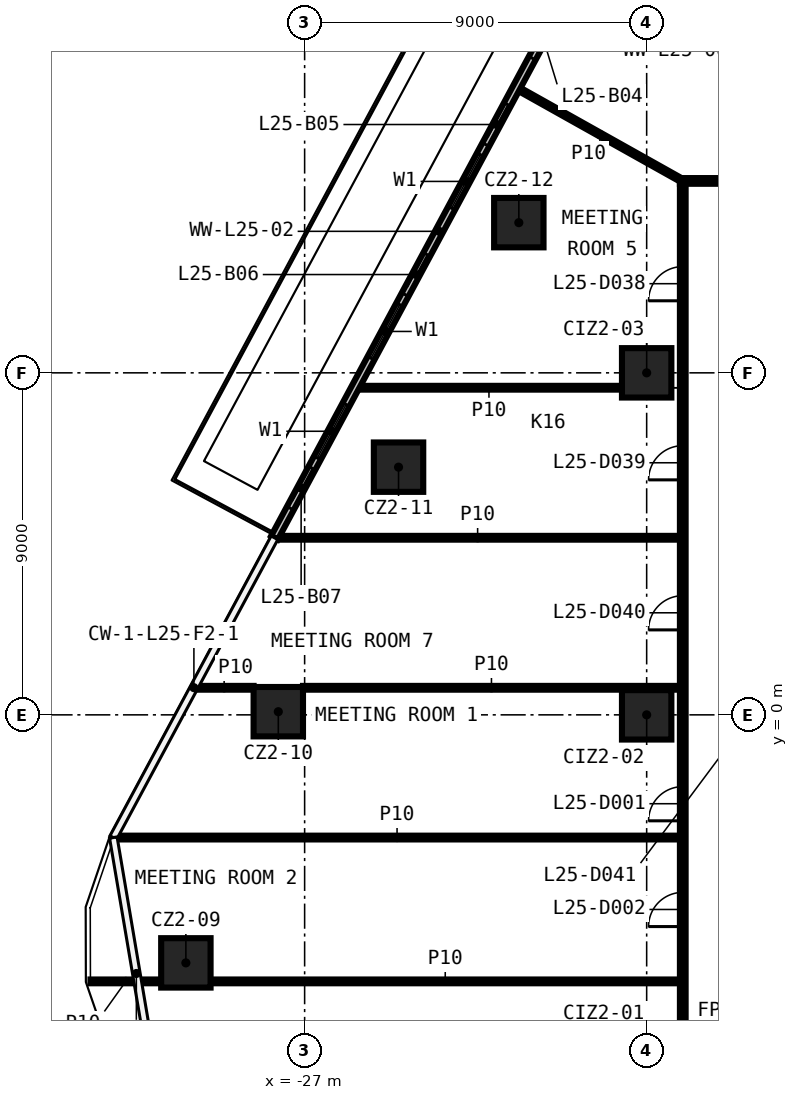
"""IFC4 building model, lengths in metres.
Left out: names, types, materials, properties, quantities, classifications, styles, units other than length and angle.
Written with IfcOpenShell. Run it as: python <this file> out.ifc"""

import sys

from ifc_helpers import new_model, si_unit, direction, frame, frame_2d, origin, origin_2d, place, context, subcontext, project, spatial, rectangle, extrude, element, fill, save


model = new_model("IFC4")
c1 = context("Model", 3, precision=1e-05, world=origin(), true_north=direction((0.0, 1.0)))
c2 = subcontext(c1, "Body", "Model", "MODEL_VIEW")
j1 = project(units=[si_unit("LENGTHUNIT", "METRE"), si_unit("PLANEANGLEUNIT", "RADIAN")], contexts=[c1])
p1 = place(None, origin())
s1 = spatial("IfcSite", under=j1, at=p1, CompositionType="ELEMENT")
p2 = place(p1, origin())
s2 = spatial("IfcBuilding", under=s1, at=p2, CompositionType="ELEMENT")
p3 = place(p2, frame((0.0, 0.0, 117.4)))
s3 = spatial("IfcBuildingStorey", under=s2, at=p3, CompositionType="ELEMENT", Elevation=117.4)
for number, where, z_axis, x_axis in (
    (1, (-30.125, -6.527, 0.0), (0.0, 0.0, 1.0), (1.0, 0.0, 0.0)),
    (2, (-27.693, 0.083, 0.0), (0.0, 0.0, 1.0), (1.0, 0.0, 0.0)),
    (3, (-24.529, 6.518, 0.0), (0.0, 0.0, 1.0), (1.0, 0.0, 0.0)),
    (4, (-21.364, 12.952, 0.0), (0.0, 0.0, 1.0), (1.0, 0.0, 0.0)),
    (5, (-18.0, 0.0, 0.0), (0.0, 0.0, 1.0), (1.0, 0.0, 0.0)),
    (6, (-18.0, 9.0, 0.0), (0.0, 0.0, 1.0), (1.0, 0.0, 0.0)),
):
    element("IfcColumn", number, at=place(p3, frame(where, z_axis=z_axis, x_axis=x_axis)), inside=s3, PredefinedType="COLUMN", context=c2, shape_type="SweptSolid", body=[
        extrude(rectangle(XDim=1.3, YDim=1.3, at=origin_2d()), origin(), (0.0, 0.0, 1.0), 3.3),
    ])
p4 = place(p3, frame((-32.635, -7.014, 0.0), z_axis=(0.0, 0.0, 1.0), x_axis=(1.0, 0.0, 0.0)))
e7 = element("IfcWall", 7, at=p4, inside=s3, PredefinedType="PARTITIONING", context=c2, shape_type="SweptSolid", body=[
    extrude(rectangle(XDim=1.86, YDim=0.1, at=frame_2d((0.93, 0.0))), origin(), (0.0, 0.0, 1.0), 3.3),
])
p5 = place(p3, frame((-29.475, -7.014, 0.0), z_axis=(0.0, 0.0, 1.0), x_axis=(1.0, 0.0, 0.0)))
e8 = element("IfcWall", 8, at=p5, inside=s3, PredefinedType="PARTITIONING", context=c2, shape_type="SweptSolid", body=[
    extrude(rectangle(XDim=12.35, YDim=0.1, at=frame_2d((6.175, 0.0))), origin(), (0.0, 0.0, 1.0), 3.3),
])
p6 = place(p3, frame((-32.011, -3.229, 0.0), z_axis=(0.0, 0.0, 1.0), x_axis=(1.0, 0.0, 0.0)))
e9 = element("IfcWall", 9, at=p6, inside=s3, PredefinedType="PARTITIONING", context=c2, shape_type="SweptSolid", body=[
    extrude(rectangle(XDim=14.886, YDim=0.1, at=frame_2d((7.443, 0.0))), origin(), (0.0, 0.0, 1.0), 3.3),
])
p7 = place(p3, frame((-29.893, 0.712, 0.0), z_axis=(0.0, 0.0, 1.0), x_axis=(1.0, 0.0, 0.0)))
e10 = element("IfcWall", 10, at=p7, inside=s3, PredefinedType="PARTITIONING", context=c2, shape_type="SweptSolid", body=[
    extrude(rectangle(XDim=1.55, YDim=0.1, at=frame_2d((0.775, 0.0))), origin(), (0.0, 0.0, 1.0), 3.3),
])
p8 = place(p3, frame((-27.043, 0.712, 0.0), z_axis=(0.0, 0.0, 1.0), x_axis=(1.0, 0.0, 0.0)))
e11 = element("IfcWall", 11, at=p8, inside=s3, PredefinedType="PARTITIONING", context=c2, shape_type="SweptSolid", body=[
    extrude(rectangle(XDim=9.918, YDim=0.1, at=frame_2d((4.959, 0.0))), origin(), (0.0, 0.0, 1.0), 3.3),
])
p9 = place(p3, frame((-27.771, 4.66, 0.0), z_axis=(0.0, 0.0, 1.0), x_axis=(1.0, 0.0, 0.0)))
e12 = element("IfcWall", 12, at=p9, inside=s3, PredefinedType="PARTITIONING", context=c2, shape_type="SweptSolid", body=[
    extrude(rectangle(XDim=10.646, YDim=0.1, at=frame_2d((5.323, 0.0))), origin(), (0.0, 0.0, 1.0), 3.3),
])
p10 = place(p3, frame((-25.649, 8.608, 0.0), z_axis=(0.0, 0.0, 1.0), x_axis=(1.0, 0.0, 0.0)))
e13 = element("IfcWall", 13, at=p10, inside=s3, PredefinedType="PARTITIONING", context=c2, shape_type="SweptSolid", body=[
    extrude(rectangle(XDim=6.999, YDim=0.1, at=frame_2d((3.5, 0.0))), origin(), (0.0, 0.0, 1.0), 3.3),
])
p11 = place(p3, frame((-17.125, 14.05, 0.0), z_axis=(0.0, 0.0, 1.0), x_axis=(1.0, 0.0, 0.0)))
e14 = element("IfcWall", 14, at=p11, inside=s3, PredefinedType="PARTITIONING", context=c2, shape_type="SweptSolid", body=[
    extrude(rectangle(XDim=34.25, YDim=0.15, at=frame_2d((17.125, 0.0))), origin(), (0.0, 0.0, 1.0), 3.3),
])
p12 = place(p11, frame((30.377, 0.0, 0.0)))
e15 = element("IfcOpeningElement", 15, at=p12, cuts=e14, PredefinedType="OPENING", context=c2, shape_type="SweptSolid", body=[
    extrude(rectangle(XDim=0.9, YDim=2.1, at=frame_2d((0.45, 1.05))), frame((0.0, 0.085, 0.0), z_axis=(0.0, -1.0, 0.0), x_axis=(1.0, 0.0, 0.0)), (0.0, 0.0, 1.0), 0.17),
])
p13 = place(p11, frame((23.321, 0.0, 0.0)))
e16 = element("IfcOpeningElement", 16, at=p13, cuts=e14, PredefinedType="OPENING", context=c2, shape_type="SweptSolid", body=[
    extrude(rectangle(XDim=1.0, YDim=2.1, at=frame_2d((0.5, 1.05))), frame((0.0, 0.085, 0.0), z_axis=(0.0, -1.0, 0.0), x_axis=(1.0, 0.0, 0.0)), (0.0, 0.0, 1.0), 0.17),
])
p14 = place(p11, frame((21.183, 0.0, 0.0)))
e17 = element("IfcOpeningElement", 17, at=p14, cuts=e14, PredefinedType="OPENING", context=c2, shape_type="SweptSolid", body=[
    extrude(rectangle(XDim=1.0, YDim=2.1, at=frame_2d((0.5, 1.05))), frame((0.0, 0.085, 0.0), z_axis=(0.0, -1.0, 0.0), x_axis=(1.0, 0.0, 0.0)), (0.0, 0.0, 1.0), 0.17),
])
p15 = place(p11, frame((14.241, 0.0, 0.0)))
e18 = element("IfcOpeningElement", 18, at=p15, cuts=e14, PredefinedType="OPENING", context=c2, shape_type="SweptSolid", body=[
    extrude(rectangle(XDim=1.0, YDim=2.1, at=frame_2d((0.5, 1.05))), frame((0.0, 0.085, 0.0), z_axis=(0.0, -1.0, 0.0), x_axis=(1.0, 0.0, 0.0)), (0.0, 0.0, 1.0), 0.17),
])
p16 = place(p11, frame((12.099, 0.0, 0.0)))
e19 = element("IfcOpeningElement", 19, at=p16, cuts=e14, PredefinedType="OPENING", context=c2, shape_type="SweptSolid", body=[
    extrude(rectangle(XDim=1.0, YDim=2.1, at=frame_2d((0.5, 1.05))), frame((0.0, 0.085, 0.0), z_axis=(0.0, -1.0, 0.0), x_axis=(1.0, 0.0, 0.0)), (0.0, 0.0, 1.0), 0.17),
])
p17 = place(p11, frame((5.161, 0.0, 0.0)))
e20 = element("IfcOpeningElement", 20, at=p17, cuts=e14, PredefinedType="OPENING", context=c2, shape_type="SweptSolid", body=[
    extrude(rectangle(XDim=1.0, YDim=2.1, at=frame_2d((0.5, 1.05))), frame((0.0, 0.085, 0.0), z_axis=(0.0, -1.0, 0.0), x_axis=(1.0, 0.0, 0.0)), (0.0, 0.0, 1.0), 0.17),
])
p18 = place(p11, frame((2.406, 0.0, 0.0)))
e21 = element("IfcOpeningElement", 21, at=p18, cuts=e14, PredefinedType="OPENING", context=c2, shape_type="SweptSolid", body=[
    extrude(rectangle(XDim=0.9, YDim=2.1, at=frame_2d((0.45, 1.05))), frame((0.0, 0.085, 0.0), z_axis=(0.0, -1.0, 0.0), x_axis=(1.0, 0.0, 0.0)), (0.0, 0.0, 1.0), 0.17),
])
p19 = place(p3, frame((-17.05, -13.975, 0.0), z_axis=(0.0, 0.0, 1.0), x_axis=(0.0, 1.0, 0.0)))
e22 = element("IfcWall", 22, at=p19, inside=s3, PredefinedType="PARTITIONING", context=c2, shape_type="SweptSolid", body=[
    extrude(rectangle(XDim=27.95, YDim=0.15, at=frame_2d((13.975, 0.0))), origin(), (0.0, 0.0, 1.0), 3.3),
])
p20 = place(p19, frame((11.186, 0.0, 0.0)))
e23 = element("IfcOpeningElement", 23, at=p20, cuts=e22, PredefinedType="OPENING", context=c2, shape_type="SweptSolid", body=[
    extrude(rectangle(XDim=0.9, YDim=2.1, at=frame_2d((0.45, 1.05))), frame((0.0, 0.085, 0.0), z_axis=(0.0, -1.0, 0.0), x_axis=(1.0, 0.0, 0.0)), (0.0, 0.0, 1.0), 0.17),
])
p21 = place(p19, frame((8.404, 0.0, 0.0)))
e24 = element("IfcOpeningElement", 24, at=p21, cuts=e22, PredefinedType="OPENING", context=c2, shape_type="SweptSolid", body=[
    extrude(rectangle(XDim=0.9, YDim=2.1, at=frame_2d((0.45, 1.05))), frame((0.0, 0.085, 0.0), z_axis=(0.0, -1.0, 0.0), x_axis=(1.0, 0.0, 0.0)), (0.0, 0.0, 1.0), 0.17),
])
p22 = place(p19, frame((1.58, 0.0, 0.0)))
e25 = element("IfcOpeningElement", 25, at=p22, cuts=e22, PredefinedType="OPENING", context=c2, shape_type="SweptSolid", body=[
    extrude(rectangle(XDim=0.9, YDim=2.1, at=frame_2d((0.45, 1.05))), frame((0.0, 0.085, 0.0), z_axis=(0.0, -1.0, 0.0), x_axis=(1.0, 0.0, 0.0)), (0.0, 0.0, 1.0), 0.17),
])
p23 = place(p19, frame((24.871, 0.0, 0.0)))
e26 = element("IfcOpeningElement", 26, at=p23, cuts=e22, PredefinedType="OPENING", context=c2, shape_type="SweptSolid", body=[
    extrude(rectangle(XDim=0.9, YDim=2.1, at=frame_2d((0.45, 1.05))), frame((0.0, 0.085, 0.0), z_axis=(0.0, -1.0, 0.0), x_axis=(1.0, 0.0, 0.0)), (0.0, 0.0, 1.0), 0.17),
])
p24 = place(p19, frame((20.159, 0.0, 0.0)))
e27 = element("IfcOpeningElement", 27, at=p24, cuts=e22, PredefinedType="OPENING", context=c2, shape_type="SweptSolid", body=[
    extrude(rectangle(XDim=0.9, YDim=2.1, at=frame_2d((0.45, 1.05))), frame((0.0, 0.085, 0.0), z_axis=(0.0, -1.0, 0.0), x_axis=(1.0, 0.0, 0.0)), (0.0, 0.0, 1.0), 0.17),
])
p25 = place(p19, frame((16.211, 0.0, 0.0)))
e28 = element("IfcOpeningElement", 28, at=p25, cuts=e22, PredefinedType="OPENING", context=c2, shape_type="SweptSolid", body=[
    extrude(rectangle(XDim=0.9, YDim=2.1, at=frame_2d((0.45, 1.05))), frame((0.0, 0.085, 0.0), z_axis=(0.0, -1.0, 0.0), x_axis=(1.0, 0.0, 0.0)), (0.0, 0.0, 1.0), 0.17),
])
p26 = place(p3, frame((-21.411, 16.494, 0.0), z_axis=(0.0, 0.0, 1.0), x_axis=(0.872342728858, -0.488894838803, 0.0)))
e29 = element("IfcWall", 29, at=p26, inside=s3, PredefinedType="PARTITIONING", context=c2, shape_type="SweptSolid", body=[
    extrude(rectangle(XDim=4.999, YDim=0.1, at=frame_2d((2.5, 0.0))), origin(), (0.0, 0.0, 1.0), 3.3),
])
p27 = place(p3, frame((-19.306, 20.451, 0.0), z_axis=(0.0, 0.0, 1.0), x_axis=(-0.473410228211, -0.880842072011, 0.0)))
e30 = element("IfcWall", 30, at=p27, inside=s3, PredefinedType="SOLIDWALL", context=c2, shape_type="SweptSolid", body=[
    extrude(rectangle(XDim=17.928, YDim=0.2, at=frame_2d((8.964, 0.0))), origin(), (0.0, 0.0, 1.0), 3.3),
])
p28 = place(p27, frame((0.5, 0.0, 0.6)))
e31 = element("IfcOpeningElement", 31, at=p28, cuts=e30, PredefinedType="OPENING", context=c2, shape_type="SweptSolid", body=[
    extrude(rectangle(XDim=1.6, YDim=2.4, at=frame_2d((0.8, 1.2))), frame((0.0, 0.11, 0.0), z_axis=(0.0, -1.0, 0.0), x_axis=(1.0, 0.0, 0.0)), (0.0, 0.0, 1.0), 0.22),
])
p29 = place(p27, frame((2.4, 0.0, 0.0)))
e32 = element("IfcOpeningElement", 32, at=p29, cuts=e30, PredefinedType="OPENING", context=c2, shape_type="SweptSolid", body=[
    extrude(rectangle(XDim=1.2, YDim=2.4, at=frame_2d((0.6, 1.2))), frame((0.0, 0.11, 0.0), z_axis=(0.0, -1.0, 0.0), x_axis=(1.0, 0.0, 0.0)), (0.0, 0.0, 1.0), 0.22),
])
p30 = place(p27, frame((6.482, 0.0, 0.6)))
e33 = element("IfcOpeningElement", 33, at=p30, cuts=e30, PredefinedType="OPENING", context=c2, shape_type="SweptSolid", body=[
    extrude(rectangle(XDim=1.6, YDim=2.4, at=frame_2d((0.8, 1.2))), frame((0.0, 0.11, 0.0), z_axis=(0.0, -1.0, 0.0), x_axis=(1.0, 0.0, 0.0)), (0.0, 0.0, 1.0), 0.22),
])
p31 = place(p27, frame((4.982, 0.0, 0.0)))
e34 = element("IfcOpeningElement", 34, at=p31, cuts=e30, PredefinedType="OPENING", context=c2, shape_type="SweptSolid", body=[
    extrude(rectangle(XDim=1.2, YDim=2.4, at=frame_2d((0.6, 1.2))), frame((0.0, 0.11, 0.0), z_axis=(0.0, -1.0, 0.0), x_axis=(1.0, 0.0, 0.0)), (0.0, 0.0, 1.0), 0.22),
])
p32 = place(p27, frame((10.964, 0.0, 0.6)))
e35 = element("IfcOpeningElement", 35, at=p32, cuts=e30, PredefinedType="OPENING", context=c2, shape_type="SweptSolid", body=[
    extrude(rectangle(XDim=1.6, YDim=2.4, at=frame_2d((0.8, 1.2))), frame((0.0, 0.11, 0.0), z_axis=(0.0, -1.0, 0.0), x_axis=(1.0, 0.0, 0.0)), (0.0, 0.0, 1.0), 0.22),
])
p33 = place(p27, frame((9.464, 0.0, 0.0)))
e36 = element("IfcOpeningElement", 36, at=p33, cuts=e30, PredefinedType="OPENING", context=c2, shape_type="SweptSolid", body=[
    extrude(rectangle(XDim=1.2, YDim=2.4, at=frame_2d((0.6, 1.2))), frame((0.0, 0.11, 0.0), z_axis=(0.0, -1.0, 0.0), x_axis=(1.0, 0.0, 0.0)), (0.0, 0.0, 1.0), 0.22),
])
p34 = place(p27, frame((13.946, 0.0, 0.6)))
e37 = element("IfcOpeningElement", 37, at=p34, cuts=e30, PredefinedType="OPENING", context=c2, shape_type="SweptSolid", body=[
    extrude(rectangle(XDim=1.6, YDim=2.4, at=frame_2d((0.8, 1.2))), frame((0.0, 0.11, 0.0), z_axis=(0.0, -1.0, 0.0), x_axis=(1.0, 0.0, 0.0)), (0.0, 0.0, 1.0), 0.22),
])
p35 = place(p27, frame((15.846, 0.0, 0.0)))
e38 = element("IfcOpeningElement", 38, at=p35, cuts=e30, PredefinedType="OPENING", context=c2, shape_type="SweptSolid", body=[
    extrude(rectangle(XDim=1.2, YDim=2.4, at=frame_2d((0.6, 1.2))), frame((0.0, 0.11, 0.0), z_axis=(0.0, -1.0, 0.0), x_axis=(1.0, 0.0, 0.0)), (0.0, 0.0, 1.0), 0.22),
])
p36 = place(p20, origin())
e39 = element("IfcDoor", 39, at=p36, inside=s3, OperationType="SINGLE_SWING_RIGHT", PredefinedType="DOOR", context=c2, shape_type="SweptSolid", body=[
    extrude(rectangle(XDim=0.9, YDim=2.1, at=frame_2d((0.45, 1.05))), frame((0.0, 0.025, 0.0), z_axis=(0.0, -1.0, 0.0), x_axis=(1.0, 0.0, 0.0)), (0.0, 0.0, 1.0), 0.05),
])
fill(e23, e39)
p37 = place(p21, origin())
e40 = element("IfcDoor", 40, at=p37, inside=s3, OperationType="SINGLE_SWING_LEFT", PredefinedType="DOOR", context=c2, shape_type="SweptSolid", body=[
    extrude(rectangle(XDim=0.9, YDim=2.1, at=frame_2d((0.45, 1.05))), frame((0.0, 0.025, 0.0), z_axis=(0.0, -1.0, 0.0), x_axis=(1.0, 0.0, 0.0)), (0.0, 0.0, 1.0), 0.05),
])
fill(e24, e40)
p38 = place(p23, origin())
e41 = element("IfcDoor", 41, at=p38, inside=s3, OperationType="SINGLE_SWING_RIGHT", PredefinedType="DOOR", context=c2, shape_type="SweptSolid", body=[
    extrude(rectangle(XDim=0.9, YDim=2.1, at=frame_2d((0.45, 1.05))), frame((0.0, 0.025, 0.0), z_axis=(0.0, -1.0, 0.0), x_axis=(1.0, 0.0, 0.0)), (0.0, 0.0, 1.0), 0.05),
])
fill(e26, e41)
p39 = place(p24, origin())
e42 = element("IfcDoor", 42, at=p39, inside=s3, OperationType="SINGLE_SWING_LEFT", PredefinedType="DOOR", context=c2, shape_type="SweptSolid", body=[
    extrude(rectangle(XDim=0.9, YDim=2.1, at=frame_2d((0.45, 1.05))), frame((0.0, 0.025, 0.0), z_axis=(0.0, -1.0, 0.0), x_axis=(1.0, 0.0, 0.0)), (0.0, 0.0, 1.0), 0.05),
])
fill(e27, e42)
p40 = place(p25, origin())
e43 = element("IfcDoor", 43, at=p40, inside=s3, OperationType="SINGLE_SWING_RIGHT", PredefinedType="DOOR", context=c2, shape_type="SweptSolid", body=[
    extrude(rectangle(XDim=0.9, YDim=2.1, at=frame_2d((0.45, 1.05))), frame((0.0, 0.025, 0.0), z_axis=(0.0, -1.0, 0.0), x_axis=(1.0, 0.0, 0.0)), (0.0, 0.0, 1.0), 0.05),
])
fill(e28, e43)
p41 = place(p29, origin())
e44 = element("IfcDoor", 44, at=p41, inside=s3, OperationType="SLIDING_TO_LEFT", PredefinedType="DOOR", context=c2, shape_type="SweptSolid", body=[
    extrude(rectangle(XDim=1.2, YDim=2.4, at=frame_2d((0.6, 1.2))), frame((0.0, 0.025, 0.0), z_axis=(0.0, -1.0, 0.0), x_axis=(1.0, 0.0, 0.0)), (0.0, 0.0, 1.0), 0.05),
])
fill(e32, e44)
p42 = place(p30, origin())
e45 = element("IfcWindow", 45, at=p42, inside=s3, PartitioningType="SINGLE_PANEL", PredefinedType="WINDOW", context=c2, shape_type="SweptSolid", body=[
    extrude(rectangle(XDim=1.6, YDim=2.4, at=frame_2d((0.8, 1.2))), frame((0.0, 0.03, 0.0), z_axis=(0.0, -1.0, 0.0), x_axis=(1.0, 0.0, 0.0)), (0.0, 0.0, 1.0), 0.06),
])
fill(e33, e45)
p43 = place(p31, origin())
e46 = element("IfcDoor", 46, at=p43, inside=s3, OperationType="SLIDING_TO_LEFT", PredefinedType="DOOR", context=c2, shape_type="SweptSolid", body=[
    extrude(rectangle(XDim=1.2, YDim=2.4, at=frame_2d((0.6, 1.2))), frame((0.0, 0.025, 0.0), z_axis=(0.0, -1.0, 0.0), x_axis=(1.0, 0.0, 0.0)), (0.0, 0.0, 1.0), 0.05),
])
fill(e34, e46)
p44 = place(p32, origin())
e47 = element("IfcWindow", 47, at=p44, inside=s3, PartitioningType="SINGLE_PANEL", PredefinedType="WINDOW", context=c2, shape_type="SweptSolid", body=[
    extrude(rectangle(XDim=1.6, YDim=2.4, at=frame_2d((0.8, 1.2))), frame((0.0, 0.03, 0.0), z_axis=(0.0, -1.0, 0.0), x_axis=(1.0, 0.0, 0.0)), (0.0, 0.0, 1.0), 0.06),
])
fill(e35, e47)
p45 = place(p33, origin())
e48 = element("IfcDoor", 48, at=p45, inside=s3, OperationType="SLIDING_TO_LEFT", PredefinedType="DOOR", context=c2, shape_type="SweptSolid", body=[
    extrude(rectangle(XDim=1.2, YDim=2.4, at=frame_2d((0.6, 1.2))), frame((0.0, 0.025, 0.0), z_axis=(0.0, -1.0, 0.0), x_axis=(1.0, 0.0, 0.0)), (0.0, 0.0, 1.0), 0.05),
])
fill(e36, e48)
p46 = place(p34, origin())
e49 = element("IfcWindow", 49, at=p46, inside=s3, PartitioningType="SINGLE_PANEL", PredefinedType="WINDOW", context=c2, shape_type="SweptSolid", body=[
    extrude(rectangle(XDim=1.6, YDim=2.4, at=frame_2d((0.8, 1.2))), frame((0.0, 0.03, 0.0), z_axis=(0.0, -1.0, 0.0), x_axis=(1.0, 0.0, 0.0)), (0.0, 0.0, 1.0), 0.06),
])
fill(e37, e49)
p47 = place(p35, origin())
e50 = element("IfcDoor", 50, at=p47, inside=s3, OperationType="SLIDING_TO_LEFT", PredefinedType="DOOR", context=c2, shape_type="SweptSolid", body=[
    extrude(rectangle(XDim=1.2, YDim=2.4, at=frame_2d((0.6, 1.2))), frame((0.0, 0.025, 0.0), z_axis=(0.0, -1.0, 0.0), x_axis=(1.0, 0.0, 0.0)), (0.0, 0.0, 1.0), 0.05),
])
fill(e38, e50)
save(model, sys.argv[1])
